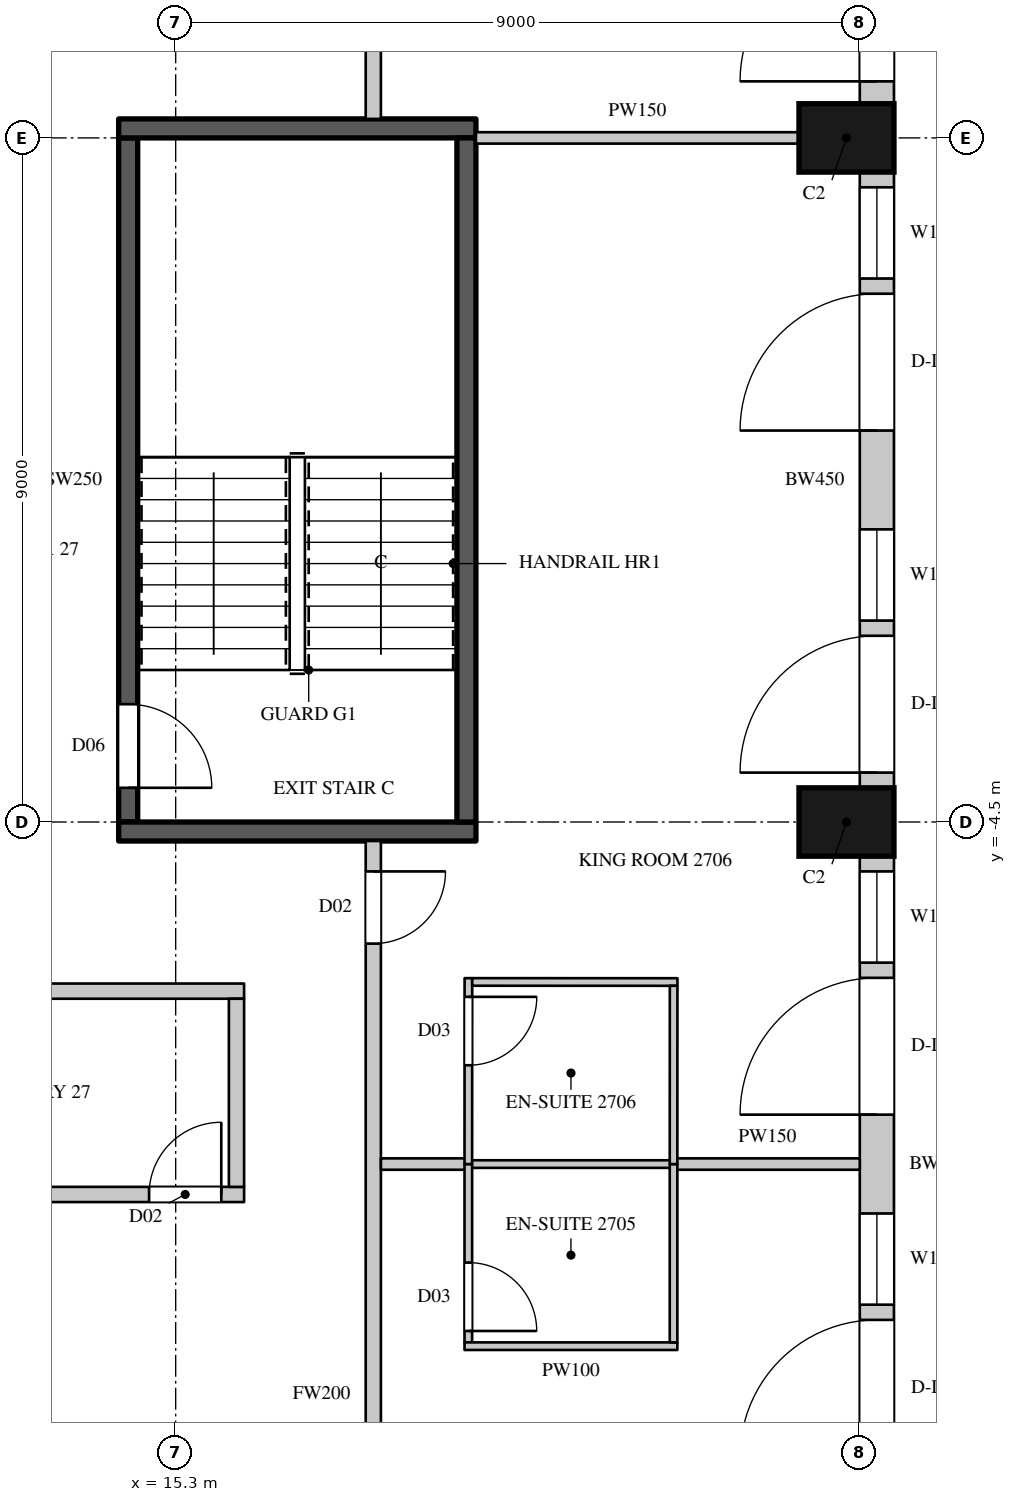
"""IFC4 building model, lengths in metres.
Left out: names, types, materials, properties, quantities, classifications, styles, units other than length and angle.
Written with IfcOpenShell. Run it as: python <this file> out.ifc"""

import sys

from ifc_helpers import new_model, si_unit, direction, frame, frame_2d, origin, origin_2d, place, context, subcontext, project, spatial, rectangle, extrude, element, fill, save


model = new_model("IFC4")
c1 = context("Model", 3, precision=1e-05, world=origin(), true_north=direction((0.0, 1.0)))
c2 = subcontext(c1, "Body", "Model", "MODEL_VIEW")
j1 = project(units=[si_unit("LENGTHUNIT", "METRE"), si_unit("PLANEANGLEUNIT", "RADIAN")], contexts=[c1])
p1 = place(None, origin())
s1 = spatial("IfcSite", under=j1, at=p1, CompositionType="ELEMENT")
p2 = place(p1, origin())
s2 = spatial("IfcBuilding", under=s1, at=p2, CompositionType="ELEMENT")
p3 = place(p2, frame((0.0, 0.0, 127.5)))
s3 = spatial("IfcBuildingStorey", under=s2, at=p3, CompositionType="ELEMENT", Elevation=127.5)
for number, where, z_axis, x_axis in (
    (1, (24.125, -4.5, 0.0), (0.0, 0.0, 1.0), (0.0, 1.0, 0.0)),
    (2, (24.125, 4.5, 0.0), (0.0, 0.0, 1.0), (0.0, 1.0, 0.0)),
):
    element("IfcColumn", number, at=place(p3, frame(where, z_axis=z_axis, x_axis=x_axis)), inside=s3, PredefinedType="COLUMN", context=c2, shape_type="SweptSolid", body=[
        extrude(rectangle(XDim=0.9, YDim=1.25, at=origin_2d()), origin(), (0.0, 0.0, 1.0), 3.6),
    ])
p4 = place(p3, frame((24.525, -13.05, 0.0), z_axis=(0.0, 0.0, 1.0), x_axis=(0.0, 1.0, 0.0)))
e3 = element("IfcWall", 3, at=p4, inside=s3, PredefinedType="SOLIDWALL", context=c2, shape_type="SweptSolid", body=[
    extrude(rectangle(XDim=8.1, YDim=0.45, at=frame_2d((4.05, 0.0))), origin(), (0.0, 0.0, 1.0), 3.3),
])
p5 = place(p4, frame((0.2, 0.0, 0.0)))
e4 = element("IfcOpeningElement", 4, at=p5, cuts=e3, PredefinedType="OPENING", context=c2, shape_type="SweptSolid", body=[
    extrude(rectangle(XDim=1.8, YDim=2.4, at=frame_2d((0.9, 1.2))), frame((0.0, 0.235, 0.0), z_axis=(0.0, -1.0, 0.0), x_axis=(1.0, 0.0, 0.0)), (0.0, 0.0, 1.0), 0.47),
])
p6 = place(p4, frame((2.2, 0.0, 1.05)))
e5 = element("IfcOpeningElement", 5, at=p6, cuts=e3, PredefinedType="OPENING", context=c2, shape_type="SweptSolid", body=[
    extrude(rectangle(XDim=1.2, YDim=2.0, at=frame_2d((0.6, 1.0))), frame((0.0, 0.235, 0.0), z_axis=(0.0, -1.0, 0.0), x_axis=(1.0, 0.0, 0.0)), (0.0, 0.0, 1.0), 0.47),
])
p7 = place(p4, frame((4.7, 0.0, 0.0)))
e6 = element("IfcOpeningElement", 6, at=p7, cuts=e3, PredefinedType="OPENING", context=c2, shape_type="SweptSolid", body=[
    extrude(rectangle(XDim=1.8, YDim=2.4, at=frame_2d((0.9, 1.2))), frame((0.0, 0.235, 0.0), z_axis=(0.0, -1.0, 0.0), x_axis=(1.0, 0.0, 0.0)), (0.0, 0.0, 1.0), 0.47),
])
p8 = place(p4, frame((6.7, 0.0, 1.05)))
e7 = element("IfcOpeningElement", 7, at=p8, cuts=e3, PredefinedType="OPENING", context=c2, shape_type="SweptSolid", body=[
    extrude(rectangle(XDim=1.2, YDim=2.0, at=frame_2d((0.6, 1.0))), frame((0.0, 0.235, 0.0), z_axis=(0.0, -1.0, 0.0), x_axis=(1.0, 0.0, 0.0)), (0.0, 0.0, 1.0), 0.47),
])
p9 = place(p3, frame((24.525, -4.05, 0.0), z_axis=(0.0, 0.0, 1.0), x_axis=(0.0, 1.0, 0.0)))
e8 = element("IfcWall", 8, at=p9, inside=s3, PredefinedType="SOLIDWALL", context=c2, shape_type="SweptSolid", body=[
    extrude(rectangle(XDim=8.1, YDim=0.45, at=frame_2d((4.05, 0.0))), origin(), (0.0, 0.0, 1.0), 3.3),
])
p10 = place(p9, frame((0.2, 0.0, 0.0)))
e9 = element("IfcOpeningElement", 9, at=p10, cuts=e8, PredefinedType="OPENING", context=c2, shape_type="SweptSolid", body=[
    extrude(rectangle(XDim=1.8, YDim=2.4, at=frame_2d((0.9, 1.2))), frame((0.0, 0.235, 0.0), z_axis=(0.0, -1.0, 0.0), x_axis=(1.0, 0.0, 0.0)), (0.0, 0.0, 1.0), 0.47),
])
p11 = place(p9, frame((2.2, 0.0, 1.05)))
e10 = element("IfcOpeningElement", 10, at=p11, cuts=e8, PredefinedType="OPENING", context=c2, shape_type="SweptSolid", body=[
    extrude(rectangle(XDim=1.2, YDim=2.0, at=frame_2d((0.6, 1.0))), frame((0.0, 0.235, 0.0), z_axis=(0.0, -1.0, 0.0), x_axis=(1.0, 0.0, 0.0)), (0.0, 0.0, 1.0), 0.47),
])
p12 = place(p9, frame((4.7, 0.0, 0.0)))
e11 = element("IfcOpeningElement", 11, at=p12, cuts=e8, PredefinedType="OPENING", context=c2, shape_type="SweptSolid", body=[
    extrude(rectangle(XDim=1.8, YDim=2.4, at=frame_2d((0.9, 1.2))), frame((0.0, 0.235, 0.0), z_axis=(0.0, -1.0, 0.0), x_axis=(1.0, 0.0, 0.0)), (0.0, 0.0, 1.0), 0.47),
])
p13 = place(p9, frame((6.7, 0.0, 1.05)))
e12 = element("IfcOpeningElement", 12, at=p13, cuts=e8, PredefinedType="OPENING", context=c2, shape_type="SweptSolid", body=[
    extrude(rectangle(XDim=1.2, YDim=2.0, at=frame_2d((0.6, 1.0))), frame((0.0, 0.235, 0.0), z_axis=(0.0, -1.0, 0.0), x_axis=(1.0, 0.0, 0.0)), (0.0, 0.0, 1.0), 0.47),
])
p14 = place(p3, frame((24.525, 4.95, 0.0), z_axis=(0.0, 0.0, 1.0), x_axis=(0.0, 1.0, 0.0)))
e13 = element("IfcWall", 13, at=p14, inside=s3, PredefinedType="SOLIDWALL", context=c2, shape_type="SweptSolid", body=[
    extrude(rectangle(XDim=8.439, YDim=0.45, at=frame_2d((4.219, 0.0))), origin(), (0.0, 0.0, 1.0), 3.3),
])
p15 = place(p14, frame((0.294, 0.0, 0.0)))
e14 = element("IfcOpeningElement", 14, at=p15, cuts=e13, PredefinedType="OPENING", context=c2, shape_type="SweptSolid", body=[
    extrude(rectangle(XDim=1.8, YDim=2.4, at=frame_2d((0.9, 1.2))), frame((0.0, 0.235, 0.0), z_axis=(0.0, -1.0, 0.0), x_axis=(1.0, 0.0, 0.0)), (0.0, 0.0, 1.0), 0.47),
])
p16 = place(p14, frame((2.294, 0.0, 1.05)))
e15 = element("IfcOpeningElement", 15, at=p16, cuts=e13, PredefinedType="OPENING", context=c2, shape_type="SweptSolid", body=[
    extrude(rectangle(XDim=1.2, YDim=2.0, at=frame_2d((0.6, 1.0))), frame((0.0, 0.235, 0.0), z_axis=(0.0, -1.0, 0.0), x_axis=(1.0, 0.0, 0.0)), (0.0, 0.0, 1.0), 0.47),
])
p17 = place(p14, frame((5.232, 0.0, 1.05)))
e16 = element("IfcOpeningElement", 16, at=p17, cuts=e13, PredefinedType="OPENING", context=c2, shape_type="SweptSolid", body=[
    extrude(rectangle(XDim=2.7, YDim=2.0, at=frame_2d((1.35, 1.0))), frame((0.0, 0.235, 0.0), z_axis=(0.0, -1.0, 0.0), x_axis=(1.0, 0.0, 0.0)), (0.0, 0.0, 1.0), 0.47),
])
p18 = place(p3, frame((10.9, -9.4, 0.0), z_axis=(0.0, 0.0, 1.0), x_axis=(1.0, 0.0, 0.0)))
e17 = element("IfcWall", 17, at=p18, inside=s3, PredefinedType="PARTITIONING", context=c2, shape_type="SweptSolid", body=[
    extrude(rectangle(XDim=5.3, YDim=0.2, at=frame_2d((2.65, 0.0))), origin(), (0.0, 0.0, 1.0), 3.3),
])
p19 = place(p18, frame((4.05, 0.0, 0.0)))
e18 = element("IfcOpeningElement", 18, at=p19, cuts=e17, PredefinedType="OPENING", context=c2, shape_type="SweptSolid", body=[
    extrude(rectangle(XDim=0.95, YDim=2.2, at=frame_2d((0.475, 1.1))), frame((0.0, 0.11, 0.0), z_axis=(0.0, -1.0, 0.0), x_axis=(1.0, 0.0, 0.0)), (0.0, 0.0, 1.0), 0.22),
])
p20 = place(p3, frame((10.9, -6.725, 0.0), z_axis=(0.0, 0.0, 1.0), x_axis=(1.0, 0.0, 0.0)))
e19 = element("IfcWall", 19, at=p20, inside=s3, PredefinedType="PARTITIONING", context=c2, shape_type="SweptSolid", body=[
    extrude(rectangle(XDim=5.3, YDim=0.2, at=frame_2d((2.65, 0.0))), origin(), (0.0, 0.0, 1.0), 3.3),
])
p21 = place(p3, frame((16.1, -9.3, 0.0), z_axis=(0.0, 0.0, 1.0), x_axis=(0.0, 1.0, 0.0)))
e20 = element("IfcWall", 20, at=p21, inside=s3, PredefinedType="PARTITIONING", context=c2, shape_type="SweptSolid", body=[
    extrude(rectangle(XDim=2.475, YDim=0.2, at=frame_2d((1.238, 0.0))), origin(), (0.0, 0.0, 1.0), 3.3),
])
p22 = place(p3, frame((17.9, -19.3, 0.0), z_axis=(0.0, 0.0, 1.0), x_axis=(0.0, 1.0, 0.0)))
e21 = element("IfcWall", 21, at=p22, inside=s3, PredefinedType="PARTITIONING", context=c2, shape_type="SweptSolid", body=[
    extrude(rectangle(XDim=14.55, YDim=0.2, at=frame_2d((7.275, 0.0))), origin(), (0.0, 0.0, 1.0), 3.3),
])
p23 = place(p22, frame((3.7, 0.0, 0.0)))
e22 = element("IfcOpeningElement", 22, at=p23, cuts=e21, PredefinedType="OPENING", context=c2, shape_type="SweptSolid", body=[
    extrude(rectangle(XDim=0.95, YDim=2.2, at=frame_2d((0.475, 1.1))), frame((0.0, 0.11, 0.0), z_axis=(0.0, -1.0, 0.0), x_axis=(1.0, 0.0, 0.0)), (0.0, 0.0, 1.0), 0.22),
])
p24 = place(p22, frame((13.2, 0.0, 0.0)))
e23 = element("IfcOpeningElement", 23, at=p24, cuts=e21, PredefinedType="OPENING", context=c2, shape_type="SweptSolid", body=[
    extrude(rectangle(XDim=0.95, YDim=2.2, at=frame_2d((0.475, 1.1))), frame((0.0, 0.11, 0.0), z_axis=(0.0, -1.0, 0.0), x_axis=(1.0, 0.0, 0.0)), (0.0, 0.0, 1.0), 0.22),
])
p25 = place(p3, frame((17.9, 4.75, 0.0), z_axis=(0.0, 0.0, 1.0), x_axis=(0.0, 1.0, 0.0)))
e24 = element("IfcWall", 24, at=p25, inside=s3, PredefinedType="PARTITIONING", context=c2, shape_type="SweptSolid", body=[
    extrude(rectangle(XDim=14.314, YDim=0.2, at=frame_2d((7.157, 0.0))), origin(), (0.0, 0.0, 1.0), 3.3),
])
p26 = place(p25, frame((1.7, 0.0, 0.0)))
e25 = element("IfcOpeningElement", 25, at=p26, cuts=e24, PredefinedType="OPENING", context=c2, shape_type="SweptSolid", body=[
    extrude(rectangle(XDim=0.9, YDim=2.2, at=frame_2d((0.45, 1.1))), frame((0.0, 0.11, 0.0), z_axis=(0.0, -1.0, 0.0), x_axis=(1.0, 0.0, 0.0)), (0.0, 0.0, 1.0), 0.22),
])
p27 = place(p25, frame((10.2, 0.0, 0.0)))
e26 = element("IfcOpeningElement", 26, at=p27, cuts=e24, PredefinedType="OPENING", context=c2, shape_type="SweptSolid", body=[
    extrude(rectangle(XDim=0.95, YDim=2.2, at=frame_2d((0.475, 1.1))), frame((0.0, 0.11, 0.0), z_axis=(0.0, -1.0, 0.0), x_axis=(1.0, 0.0, 0.0)), (0.0, 0.0, 1.0), 0.22),
])
p28 = place(p3, frame((18.0, -9.0, 0.0), z_axis=(0.0, 0.0, 1.0), x_axis=(1.0, 0.0, 0.0)))
e27 = element("IfcWall", 27, at=p28, inside=s3, PredefinedType="PARTITIONING", context=c2, shape_type="SweptSolid", body=[
    extrude(rectangle(XDim=1.13, YDim=0.15, at=frame_2d((0.565, 0.0))), origin(), (0.0, 0.0, 1.0), 2.65),
])
p29 = place(p3, frame((19.25, 4.5, 0.0), z_axis=(0.0, 0.0, 1.0), x_axis=(1.0, 0.0, 0.0)))
e28 = element("IfcWall", 28, at=p29, inside=s3, PredefinedType="PARTITIONING", context=c2, shape_type="SweptSolid", body=[
    extrude(rectangle(XDim=4.25, YDim=0.15, at=frame_2d((2.125, 0.0))), origin(), (0.0, 0.0, 1.0), 3.3),
])
p30 = place(p3, frame((21.87, -9.0, 0.0), z_axis=(0.0, 0.0, 1.0), x_axis=(1.0, 0.0, 0.0)))
e29 = element("IfcWall", 29, at=p30, inside=s3, PredefinedType="PARTITIONING", context=c2, shape_type="SweptSolid", body=[
    extrude(rectangle(XDim=2.43, YDim=0.15, at=frame_2d((1.215, 0.0))), origin(), (0.0, 0.0, 1.0), 2.65),
])
p31 = place(p3, frame((14.675, -4.5, 0.0), z_axis=(0.0, 0.0, 1.0), x_axis=(0.0, 1.0, 0.0)))
e30 = element("IfcWall", 30, at=p31, inside=s3, PredefinedType="SHEAR", context=c2, shape_type="SweptSolid", body=[
    extrude(rectangle(XDim=9.0, YDim=0.25, at=frame_2d((4.5, 0.0))), origin(), (0.0, 0.0, 1.0), 3.3),
])
p32 = place(p31, frame((0.45, 0.0, 0.0)))
e31 = element("IfcOpeningElement", 31, at=p32, cuts=e30, PredefinedType="OPENING", context=c2, shape_type="SweptSolid", body=[
    extrude(rectangle(XDim=1.1, YDim=2.2, at=frame_2d((0.55, 1.1))), frame((0.0, 0.135, 0.0), z_axis=(0.0, -1.0, 0.0), x_axis=(1.0, 0.0, 0.0)), (0.0, 0.0, 1.0), 0.27),
])
for number, where, z_axis, x_axis in (
    (32, (14.55, -4.625, 0.0), (0.0, 0.0, 1.0), (1.0, 0.0, 0.0)),
    (33, (14.55, 4.625, 0.0), (0.0, 0.0, 1.0), (1.0, 0.0, 0.0)),
):
    element("IfcWall", number, at=place(p3, frame(where, z_axis=z_axis, x_axis=x_axis)), inside=s3, PredefinedType="SHEAR", context=c2, shape_type="SweptSolid", body=[
        extrude(rectangle(XDim=4.7, YDim=0.25, at=frame_2d((2.35, 0.0))), origin(), (0.0, 0.0, 1.0), 3.3),
    ])
p33 = place(p3, frame((19.125, -4.5, 0.0), z_axis=(0.0, 0.0, 1.0), x_axis=(0.0, 1.0, 0.0)))
e34 = element("IfcWall", 34, at=p33, inside=s3, PredefinedType="SHEAR", context=c2, shape_type="SweptSolid", body=[
    extrude(rectangle(XDim=9.0, YDim=0.25, at=frame_2d((4.5, 0.0))), origin(), (0.0, 0.0, 1.0), 3.3),
])
p34 = place(p3, frame((19.13, -9.0, 0.0), z_axis=(0.0, 0.0, 1.0), x_axis=(1.0, 0.0, 0.0)))
e35 = element("IfcWall", 35, at=p34, inside=s3, PredefinedType="PARTITIONING", context=c2, shape_type="SweptSolid", body=[
    extrude(rectangle(XDim=2.74, YDim=0.1, at=frame_2d((1.37, 0.0))), origin(), (0.0, 0.0, 1.0), 2.65),
])
p35 = place(p3, frame((19.15, -11.346, 0.0), z_axis=(0.0, 0.0, 1.0), x_axis=(0.0, 1.0, 0.0)))
e36 = element("IfcWall", 36, at=p35, inside=s3, PredefinedType="PARTITIONING", context=c2, shape_type="SweptSolid", body=[
    extrude(rectangle(XDim=2.346, YDim=0.1, at=frame_2d((1.173, 0.0))), origin(), (0.0, 0.0, 1.0), 3.3),
])
p36 = place(p35, frame((0.15, 0.0, 0.0)))
e37 = element("IfcOpeningElement", 37, at=p36, cuts=e36, PredefinedType="OPENING", context=c2, shape_type="SweptSolid", body=[
    extrude(rectangle(XDim=0.9, YDim=2.2, at=frame_2d((0.45, 1.1))), frame((0.0, 0.06, 0.0), z_axis=(0.0, -1.0, 0.0), x_axis=(1.0, 0.0, 0.0)), (0.0, 0.0, 1.0), 0.12),
])
p37 = place(p3, frame((19.1, -11.396, 0.0), z_axis=(0.0, 0.0, 1.0), x_axis=(1.0, 0.0, 0.0)))
e38 = element("IfcWall", 38, at=p37, inside=s3, PredefinedType="PARTITIONING", context=c2, shape_type="SweptSolid", body=[
    extrude(rectangle(XDim=2.8, YDim=0.1, at=frame_2d((1.4, 0.0))), origin(), (0.0, 0.0, 1.0), 3.3),
])
p38 = place(p3, frame((19.15, -9.0, 0.0), z_axis=(0.0, 0.0, 1.0), x_axis=(0.000499051739, 0.999999875474, 0.0)))
e39 = element("IfcWall", 39, at=p38, inside=s3, PredefinedType="PARTITIONING", context=c2, shape_type="SweptSolid", body=[
    extrude(rectangle(XDim=2.446, YDim=0.1, at=frame_2d((1.223, 0.0))), origin(), (0.0, 0.0, 1.0), 3.3),
])
p39 = place(p38, frame((1.3, 0.0, 0.0)))
e40 = element("IfcOpeningElement", 40, at=p39, cuts=e39, PredefinedType="OPENING", context=c2, shape_type="SweptSolid", body=[
    extrude(rectangle(XDim=0.9, YDim=2.2, at=frame_2d((0.45, 1.1))), frame((0.0, 0.06, 0.0), z_axis=(0.0, -1.0, 0.0), x_axis=(1.0, 0.0, 0.0)), (0.0, 0.0, 1.0), 0.12),
])
p40 = place(p3, frame((19.201, -6.604, 0.0), z_axis=(0.0, 0.0, 1.0), x_axis=(0.999999934588, -0.000361696332, 0.0)))
e41 = element("IfcWall", 41, at=p40, inside=s3, PredefinedType="PARTITIONING", context=c2, shape_type="SweptSolid", body=[
    extrude(rectangle(XDim=2.7, YDim=0.1, at=frame_2d((1.35, 0.0))), origin(), (0.0, 0.0, 1.0), 3.3),
])
p41 = place(p3, frame((21.85, -11.346, 0.0), z_axis=(0.0, 0.0, 1.0), x_axis=(0.0, 1.0, 0.0)))
e42 = element("IfcWall", 42, at=p41, inside=s3, PredefinedType="PARTITIONING", context=c2, shape_type="SweptSolid", body=[
    extrude(rectangle(XDim=2.346, YDim=0.1, at=frame_2d((1.173, 0.0))), origin(), (0.0, 0.0, 1.0), 3.3),
])
p42 = place(p3, frame((21.85, -9.0, 0.0), z_axis=(0.0, 0.0, 1.0), x_axis=(0.00041644973, 0.999999913285, 0.0)))
e43 = element("IfcWall", 43, at=p42, inside=s3, PredefinedType="PARTITIONING", context=c2, shape_type="SweptSolid", body=[
    extrude(rectangle(XDim=2.345, YDim=0.1, at=frame_2d((1.172, 0.0))), origin(), (0.0, 0.0, 1.0), 3.3),
])
p43 = place(p5, origin())
e44 = element("IfcDoor", 44, at=p43, inside=s3, OperationType="SLIDING_TO_LEFT", PredefinedType="DOOR", context=c2, shape_type="SweptSolid", body=[
    extrude(rectangle(XDim=1.8, YDim=2.4, at=frame_2d((0.9, 1.2))), frame((0.0, 0.13, 0.0), z_axis=(0.0, -1.0, 0.0), x_axis=(1.0, 0.0, 0.0)), (0.0, 0.0, 1.0), 0.05),
])
fill(e4, e44)
p44 = place(p6, origin())
e45 = element("IfcWindow", 45, at=p44, inside=s3, PartitioningType="SINGLE_PANEL", PredefinedType="WINDOW", context=c2, shape_type="SweptSolid", body=[
    extrude(rectangle(XDim=1.2, YDim=2.0, at=frame_2d((0.6, 1.0))), frame((0.0, 0.135, 0.0), z_axis=(0.0, -1.0, 0.0), x_axis=(1.0, 0.0, 0.0)), (0.0, 0.0, 1.0), 0.06),
])
fill(e5, e45)
p45 = place(p7, origin())
e46 = element("IfcDoor", 46, at=p45, inside=s3, OperationType="SLIDING_TO_LEFT", PredefinedType="DOOR", context=c2, shape_type="SweptSolid", body=[
    extrude(rectangle(XDim=1.8, YDim=2.4, at=frame_2d((0.9, 1.2))), frame((0.0, 0.13, 0.0), z_axis=(0.0, -1.0, 0.0), x_axis=(1.0, 0.0, 0.0)), (0.0, 0.0, 1.0), 0.05),
])
fill(e6, e46)
p46 = place(p8, origin())
e47 = element("IfcWindow", 47, at=p46, inside=s3, PartitioningType="SINGLE_PANEL", PredefinedType="WINDOW", context=c2, shape_type="SweptSolid", body=[
    extrude(rectangle(XDim=1.2, YDim=2.0, at=frame_2d((0.6, 1.0))), frame((0.0, 0.135, 0.0), z_axis=(0.0, -1.0, 0.0), x_axis=(1.0, 0.0, 0.0)), (0.0, 0.0, 1.0), 0.06),
])
fill(e7, e47)
p47 = place(p10, origin())
e48 = element("IfcDoor", 48, at=p47, inside=s3, OperationType="SLIDING_TO_LEFT", PredefinedType="DOOR", context=c2, shape_type="SweptSolid", body=[
    extrude(rectangle(XDim=1.8, YDim=2.4, at=frame_2d((0.9, 1.2))), frame((0.0, 0.13, 0.0), z_axis=(0.0, -1.0, 0.0), x_axis=(1.0, 0.0, 0.0)), (0.0, 0.0, 1.0), 0.05),
])
fill(e9, e48)
p48 = place(p11, origin())
e49 = element("IfcWindow", 49, at=p48, inside=s3, PartitioningType="SINGLE_PANEL", PredefinedType="WINDOW", context=c2, shape_type="SweptSolid", body=[
    extrude(rectangle(XDim=1.2, YDim=2.0, at=frame_2d((0.6, 1.0))), frame((0.0, 0.135, 0.0), z_axis=(0.0, -1.0, 0.0), x_axis=(1.0, 0.0, 0.0)), (0.0, 0.0, 1.0), 0.06),
])
fill(e10, e49)
p49 = place(p12, origin())
e50 = element("IfcDoor", 50, at=p49, inside=s3, OperationType="SLIDING_TO_LEFT", PredefinedType="DOOR", context=c2, shape_type="SweptSolid", body=[
    extrude(rectangle(XDim=1.8, YDim=2.4, at=frame_2d((0.9, 1.2))), frame((0.0, 0.13, 0.0), z_axis=(0.0, -1.0, 0.0), x_axis=(1.0, 0.0, 0.0)), (0.0, 0.0, 1.0), 0.05),
])
fill(e11, e50)
p50 = place(p13, origin())
e51 = element("IfcWindow", 51, at=p50, inside=s3, PartitioningType="SINGLE_PANEL", PredefinedType="WINDOW", context=c2, shape_type="SweptSolid", body=[
    extrude(rectangle(XDim=1.2, YDim=2.0, at=frame_2d((0.6, 1.0))), frame((0.0, 0.135, 0.0), z_axis=(0.0, -1.0, 0.0), x_axis=(1.0, 0.0, 0.0)), (0.0, 0.0, 1.0), 0.06),
])
fill(e12, e51)
p51 = place(p15, origin())
e52 = element("IfcDoor", 52, at=p51, inside=s3, OperationType="SLIDING_TO_LEFT", PredefinedType="DOOR", context=c2, shape_type="SweptSolid", body=[
    extrude(rectangle(XDim=1.8, YDim=2.4, at=frame_2d((0.9, 1.2))), frame((0.0, 0.13, 0.0), z_axis=(0.0, -1.0, 0.0), x_axis=(1.0, 0.0, 0.0)), (0.0, 0.0, 1.0), 0.05),
])
fill(e14, e52)
p52 = place(p19, origin())
e53 = element("IfcDoor", 53, at=p52, inside=s3, OperationType="SINGLE_SWING_RIGHT", PredefinedType="DOOR", context=c2, shape_type="SweptSolid", body=[
    extrude(rectangle(XDim=0.95, YDim=2.2, at=frame_2d((0.475, 1.1))), frame((0.0, 0.025, 0.0), z_axis=(0.0, -1.0, 0.0), x_axis=(1.0, 0.0, 0.0)), (0.0, 0.0, 1.0), 0.05),
])
fill(e18, e53)
p53 = place(p36, origin())
e54 = element("IfcDoor", 54, at=p53, inside=s3, OperationType="SINGLE_SWING_RIGHT", PredefinedType="DOOR", context=c2, shape_type="SweptSolid", body=[
    extrude(rectangle(XDim=0.9, YDim=2.2, at=frame_2d((0.45, 1.1))), frame((0.0, 0.025, 0.0), z_axis=(0.0, -1.0, 0.0), x_axis=(1.0, 0.0, 0.0)), (0.0, 0.0, 1.0), 0.05),
])
fill(e37, e54)
p54 = place(p24, origin())
e55 = element("IfcDoor", 55, at=p54, inside=s3, OperationType="SINGLE_SWING_LEFT", PredefinedType="DOOR", context=c2, shape_type="SweptSolid", body=[
    extrude(rectangle(XDim=0.95, YDim=2.2, at=frame_2d((0.475, 1.1))), frame((0.0, 0.025, 0.0), z_axis=(0.0, -1.0, 0.0), x_axis=(1.0, 0.0, 0.0)), (0.0, 0.0, 1.0), 0.05),
])
fill(e23, e55)
p55 = place(p39, origin())
e56 = element("IfcDoor", 56, at=p55, inside=s3, OperationType="SINGLE_SWING_LEFT", PredefinedType="DOOR", context=c2, shape_type="SweptSolid", body=[
    extrude(rectangle(XDim=0.9, YDim=2.2, at=frame_2d((0.45, 1.1))), frame((0.0, 0.025, 0.0), z_axis=(0.0, -1.0, 0.0), x_axis=(1.0, 0.0, 0.0)), (0.0, 0.0, 1.0), 0.05),
])
fill(e40, e56)
p56 = place(p32, origin())
e57 = element("IfcDoor", 57, at=p56, inside=s3, OperationType="SINGLE_SWING_RIGHT", PredefinedType="DOOR", context=c2, shape_type="SweptSolid", body=[
    extrude(rectangle(XDim=1.1, YDim=2.2, at=frame_2d((0.55, 1.1))), frame((0.0, 0.025, 0.0), z_axis=(0.0, -1.0, 0.0), x_axis=(1.0, 0.0, 0.0)), (0.0, 0.0, 1.0), 0.05),
])
fill(e31, e57)
save(model, sys.argv[1])
